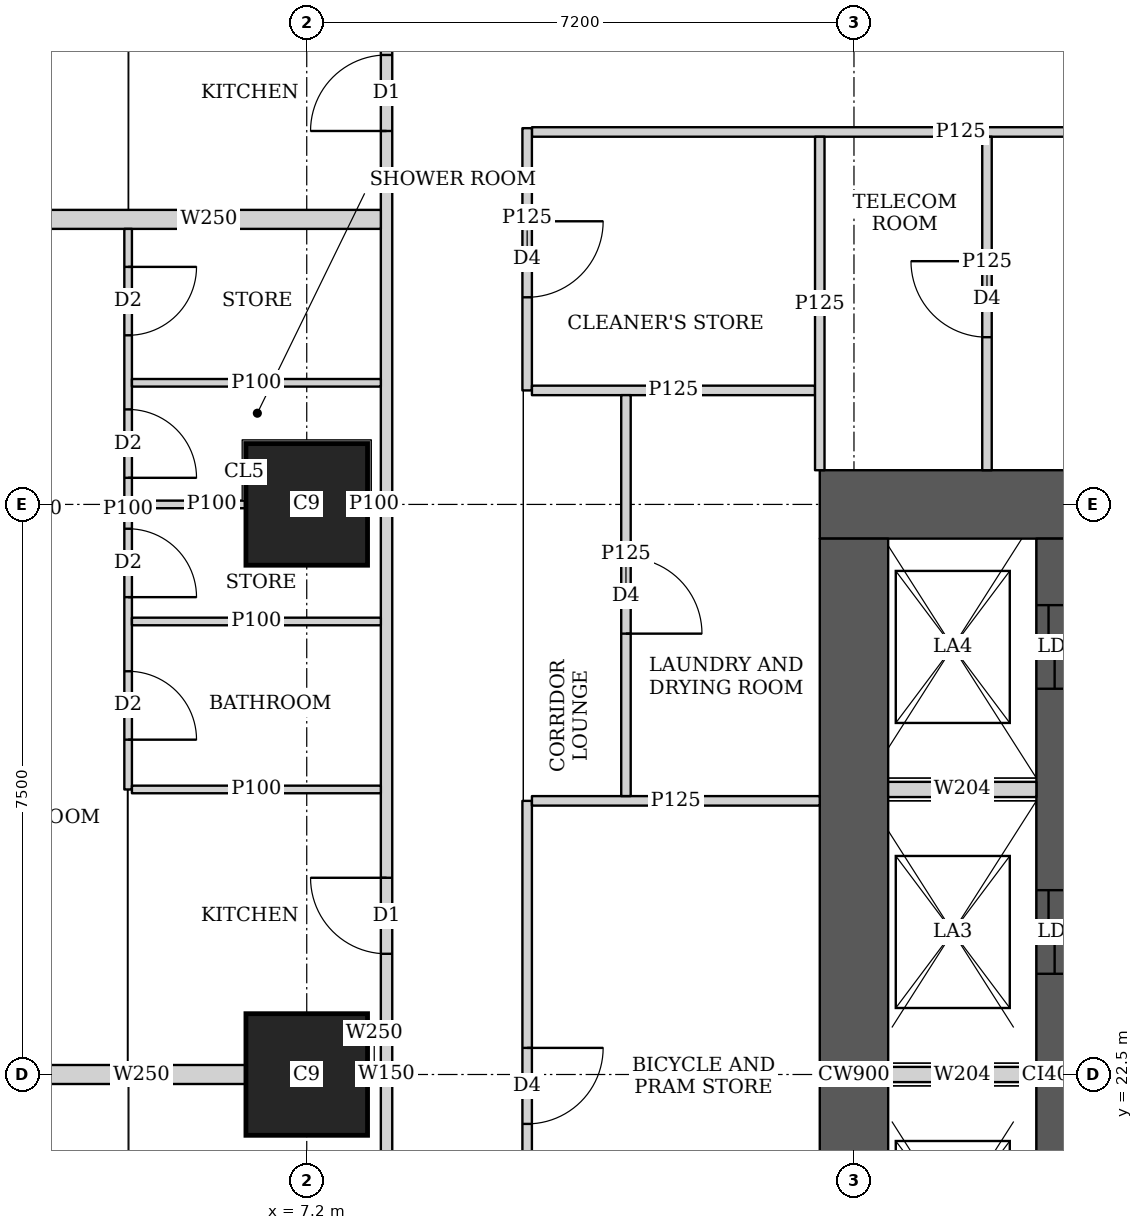
"""IFC4 building model, lengths in metres.
Left out: names, types, materials, properties, quantities, classifications, styles, units other than length and angle.
Written with IfcOpenShell. Run it as: python <this file> out.ifc"""

import sys

from ifc_helpers import new_model, si_unit, direction, frame, frame_2d, origin, origin_2d, place, context, subcontext, project, spatial, rectangle, extrude, element, fill, save


model = new_model("IFC4")
c1 = context("Model", 3, precision=1e-05, world=origin(), true_north=direction((0.0, 1.0)))
c2 = subcontext(c1, "Body", "Model", "MODEL_VIEW")
j1 = project(units=[si_unit("LENGTHUNIT", "METRE"), si_unit("PLANEANGLEUNIT", "RADIAN")], contexts=[c1])
p1 = place(None, origin())
s1 = spatial("IfcSite", under=j1, at=p1, CompositionType="ELEMENT")
p2 = place(p1, origin())
s2 = spatial("IfcBuilding", under=s1, at=p2, CompositionType="ELEMENT")
p3 = place(p2, frame((0.0, 0.0, 81.65)))
s3 = spatial("IfcBuildingStorey", under=s2, at=p3, CompositionType="ELEMENT", Elevation=81.65)
for number, where, z_axis, x_axis in (
    (1, (7.2, 22.5, 0.0), (0.0, 0.0, 1.0), (1.0, 0.0, 0.0)),
    (2, (7.2, 30.0, 0.0), (0.0, 0.0, 1.0), (1.0, 0.0, 0.0)),
):
    element("IfcColumn", number, at=place(p3, frame(where, z_axis=z_axis, x_axis=x_axis)), inside=s3, PredefinedType="COLUMN", context=c2, shape_type="SweptSolid", body=[
        extrude(rectangle(XDim=1.6, YDim=1.6, at=origin_2d()), origin(), (0.0, 0.0, 1.0), 3.75),
    ])
p4 = place(p3, frame((13.95, 30.0, 0.0), z_axis=(0.0, 0.0, 1.0), x_axis=(1.0, 0.0, 0.0)))
e3 = element("IfcWall", 3, at=p4, inside=s3, PredefinedType="SHEAR", context=c2, shape_type="SweptSolid", body=[
    extrude(rectangle(XDim=15.3, YDim=0.9, at=frame_2d((7.65, 0.0))), origin(), (0.0, 0.0, 1.0), 3.75),
])
p5 = place(p4, frame((4.45, 0.0, 0.0)))
e4 = element("IfcOpeningElement", 4, at=p5, cuts=e3, PredefinedType="OPENING", context=c2, shape_type="SweptSolid", body=[
    extrude(rectangle(XDim=1.8, YDim=2.1, at=frame_2d((0.9, 1.05))), frame((0.0, 0.46, 0.0), z_axis=(0.0, -1.0, 0.0), x_axis=(1.0, 0.0, 0.0)), (0.0, 0.0, 1.0), 0.92),
])
p6 = place(p4, frame((10.7, 0.0, 0.0)))
e5 = element("IfcOpeningElement", 5, at=p6, cuts=e3, PredefinedType="OPENING", context=c2, shape_type="SweptSolid", body=[
    extrude(rectangle(XDim=1.1, YDim=2.1, at=frame_2d((0.55, 1.05))), frame((0.0, 0.46, 0.0), z_axis=(0.0, -1.0, 0.0), x_axis=(1.0, 0.0, 0.0)), (0.0, 0.0, 1.0), 0.92),
])
p7 = place(p3, frame((14.4, 15.45, 0.0), z_axis=(0.0, 0.0, 1.0), x_axis=(0.0, 1.0, 0.0)))
e6 = element("IfcWall", 6, at=p7, inside=s3, PredefinedType="SHEAR", context=c2, shape_type="SweptSolid", body=[
    extrude(rectangle(XDim=14.1, YDim=0.9, at=frame_2d((7.05, 0.0))), origin(), (0.0, 0.0, 1.0), 3.75),
])
p8 = place(p3, frame((17.0, 15.45, 0.0), z_axis=(0.0, 0.0, 1.0), x_axis=(0.0, 1.0, 0.0)))
e7 = element("IfcWall", 7, at=p8, inside=s3, PredefinedType="SHEAR", context=c2, shape_type="SweptSolid", body=[
    extrude(rectangle(XDim=14.1, YDim=0.4, at=frame_2d((7.05, 0.0))), origin(), (0.0, 0.0, 1.0), 3.75),
])
p9 = place(p8, frame((0.875, 0.0, 0.0)))
e8 = element("IfcOpeningElement", 8, at=p9, cuts=e7, PredefinedType="OPENING", context=c2, shape_type="SweptSolid", body=[
    extrude(rectangle(XDim=1.1, YDim=2.1, at=frame_2d((0.55, 1.05))), frame((0.0, 0.21, 0.0), z_axis=(0.0, -1.0, 0.0), x_axis=(1.0, 0.0, 0.0)), (0.0, 0.0, 1.0), 0.42),
])
p10 = place(p8, frame((4.625, 0.0, 0.0)))
e9 = element("IfcOpeningElement", 9, at=p10, cuts=e7, PredefinedType="OPENING", context=c2, shape_type="SweptSolid", body=[
    extrude(rectangle(XDim=1.1, YDim=2.1, at=frame_2d((0.55, 1.05))), frame((0.0, 0.21, 0.0), z_axis=(0.0, -1.0, 0.0), x_axis=(1.0, 0.0, 0.0)), (0.0, 0.0, 1.0), 0.42),
])
p11 = place(p8, frame((8.375, 0.0, 0.0)))
e10 = element("IfcOpeningElement", 10, at=p11, cuts=e7, PredefinedType="OPENING", context=c2, shape_type="SweptSolid", body=[
    extrude(rectangle(XDim=1.1, YDim=2.1, at=frame_2d((0.55, 1.05))), frame((0.0, 0.21, 0.0), z_axis=(0.0, -1.0, 0.0), x_axis=(1.0, 0.0, 0.0)), (0.0, 0.0, 1.0), 0.42),
])
p12 = place(p8, frame((12.125, 0.0, 0.0)))
e11 = element("IfcOpeningElement", 11, at=p12, cuts=e7, PredefinedType="OPENING", context=c2, shape_type="SweptSolid", body=[
    extrude(rectangle(XDim=1.1, YDim=2.1, at=frame_2d((0.55, 1.05))), frame((0.0, 0.21, 0.0), z_axis=(0.0, -1.0, 0.0), x_axis=(1.0, 0.0, 0.0)), (0.0, 0.0, 1.0), 0.42),
])
p13 = place(p3, frame((8.25, 2.126, 0.0), z_axis=(0.0, 0.0, 1.0), x_axis=(0.0, 1.0, 0.0)))
e12 = element("IfcWall", 12, at=p13, inside=s3, PredefinedType="SOLIDWALL", context=c2, shape_type="SweptSolid", body=[
    extrude(rectangle(XDim=40.773, YDim=0.15, at=frame_2d((20.386, 0.0))), origin(), (0.0, 0.0, 1.0), 3.5),
])
p14 = place(p13, frame((17.787, 0.0, 0.0)))
e13 = element("IfcOpeningElement", 13, at=p14, cuts=e12, PredefinedType="OPENING", context=c2, shape_type="SweptSolid", body=[
    extrude(rectangle(XDim=1.0, YDim=2.1, at=frame_2d((0.5, 1.05))), frame((0.0, 0.085, 0.0), z_axis=(0.0, -1.0, 0.0), x_axis=(1.0, 0.0, 0.0)), (0.0, 0.0, 1.0), 0.17),
])
p15 = place(p13, frame((21.962, 0.0, 0.0)))
e14 = element("IfcOpeningElement", 14, at=p15, cuts=e12, PredefinedType="OPENING", context=c2, shape_type="SweptSolid", body=[
    extrude(rectangle(XDim=1.0, YDim=2.1, at=frame_2d((0.5, 1.05))), frame((0.0, 0.085, 0.0), z_axis=(0.0, -1.0, 0.0), x_axis=(1.0, 0.0, 0.0)), (0.0, 0.0, 1.0), 0.17),
])
p16 = place(p13, frame((32.787, 0.0, 0.0)))
e15 = element("IfcOpeningElement", 15, at=p16, cuts=e12, PredefinedType="OPENING", context=c2, shape_type="SweptSolid", body=[
    extrude(rectangle(XDim=1.0, YDim=2.1, at=frame_2d((0.5, 1.05))), frame((0.0, 0.085, 0.0), z_axis=(0.0, -1.0, 0.0), x_axis=(1.0, 0.0, 0.0)), (0.0, 0.0, 1.0), 0.17),
])
p17 = place(p3, frame((4.85, 26.25, 0.0), z_axis=(0.0, 0.0, 1.0), x_axis=(0.0, 1.0, 0.0)))
e16 = element("IfcWall", 16, at=p17, inside=s3, PredefinedType="PARTITIONING", context=c2, shape_type="SweptSolid", body=[
    extrude(rectangle(XDim=7.375, YDim=0.1, at=frame_2d((3.688, 0.0))), origin(), (0.0, 0.0, 1.0), 3.5),
])
p18 = place(p17, frame((0.655, 0.0, 0.0)))
e17 = element("IfcOpeningElement", 17, at=p18, cuts=e16, PredefinedType="OPENING", context=c2, shape_type="SweptSolid", body=[
    extrude(rectangle(XDim=0.9, YDim=2.1, at=frame_2d((0.45, 1.05))), frame((0.0, 0.06, 0.0), z_axis=(0.0, -1.0, 0.0), x_axis=(1.0, 0.0, 0.0)), (0.0, 0.0, 1.0), 0.12),
])
p19 = place(p17, frame((4.1, 0.0, 0.0)))
e18 = element("IfcOpeningElement", 18, at=p19, cuts=e16, PredefinedType="OPENING", context=c2, shape_type="SweptSolid", body=[
    extrude(rectangle(XDim=0.9, YDim=2.1, at=frame_2d((0.45, 1.05))), frame((0.0, 0.06, 0.0), z_axis=(0.0, -1.0, 0.0), x_axis=(1.0, 0.0, 0.0)), (0.0, 0.0, 1.0), 0.12),
])
p20 = place(p17, frame((2.53, 0.0, 0.0)))
e19 = element("IfcOpeningElement", 19, at=p20, cuts=e16, PredefinedType="OPENING", context=c2, shape_type="SweptSolid", body=[
    extrude(rectangle(XDim=0.9, YDim=2.1, at=frame_2d((0.45, 1.05))), frame((0.0, 0.06, 0.0), z_axis=(0.0, -1.0, 0.0), x_axis=(1.0, 0.0, 0.0)), (0.0, 0.0, 1.0), 0.12),
])
p21 = place(p17, frame((5.975, 0.0, 0.0)))
e20 = element("IfcOpeningElement", 20, at=p21, cuts=e16, PredefinedType="OPENING", context=c2, shape_type="SweptSolid", body=[
    extrude(rectangle(XDim=0.9, YDim=2.1, at=frame_2d((0.45, 1.05))), frame((0.0, 0.06, 0.0), z_axis=(0.0, -1.0, 0.0), x_axis=(1.0, 0.0, 0.0)), (0.0, 0.0, 1.0), 0.12),
])
p22 = place(p3, frame((4.9, 26.25, 0.0), z_axis=(0.0, 0.0, 1.0), x_axis=(1.0, 0.0, 0.0)))
e21 = element("IfcWall", 21, at=p22, inside=s3, PredefinedType="PARTITIONING", context=c2, shape_type="SweptSolid", body=[
    extrude(rectangle(XDim=3.275, YDim=0.1, at=frame_2d((1.638, 0.0))), origin(), (0.0, 0.0, 1.0), 3.5),
])
p23 = place(p3, frame((4.9, 30.0, 0.0), z_axis=(0.0, 0.0, 1.0), x_axis=(1.0, 0.0, 0.0)))
e22 = element("IfcWall", 22, at=p23, inside=s3, PredefinedType="PARTITIONING", context=c2, shape_type="SweptSolid", body=[
    extrude(rectangle(XDim=1.499, YDim=0.1, at=frame_2d((0.75, 0.0))), origin(), (0.0, 0.0, 1.0), 3.5),
])
p24 = place(p3, frame((8.001, 30.0, 0.0), z_axis=(0.0, 0.0, 1.0), x_axis=(1.0, 0.0, 0.0)))
e23 = element("IfcWall", 23, at=p24, inside=s3, PredefinedType="PARTITIONING", context=c2, shape_type="SweptSolid", body=[
    extrude(rectangle(XDim=0.174, YDim=0.1, at=frame_2d((0.087, 0.0))), origin(), (0.0, 0.0, 1.0), 3.5),
])
for number, where, z_axis, x_axis in (
    (24, (4.9, 28.46, 0.0), (0.0, 0.0, 1.0), (1.0, 0.0, 0.0)),
    (25, (4.9, 31.6, 0.0), (0.0, 0.0, 1.0), (1.0, 0.0, 0.0)),
):
    element("IfcWall", number, at=place(p3, frame(where, z_axis=z_axis, x_axis=x_axis)), inside=s3, PredefinedType="PARTITIONING", context=c2, shape_type="SweptSolid", body=[
        extrude(rectangle(XDim=3.275, YDim=0.1, at=frame_2d((1.638, 0.0))), origin(), (0.0, 0.0, 1.0), 3.5),
    ])
p25 = place(p3, frame((3.65, 22.5, 0.0), z_axis=(0.0, 0.0, 1.0), x_axis=(1.0, 0.0, 0.0)))
e26 = element("IfcWall", 26, at=p25, inside=s3, PredefinedType="SOLIDWALL", context=c2, shape_type="SweptSolid", body=[
    extrude(rectangle(XDim=2.749, YDim=0.25, at=frame_2d((1.375, 0.0))), origin(), (0.0, 0.0, 1.0), 3.5),
])
p26 = place(p3, frame((8.001, 22.5, 0.0), z_axis=(0.0, 0.0, 1.0), x_axis=(1.0, 0.0, 0.0)))
e27 = element("IfcWall", 27, at=p26, inside=s3, PredefinedType="SOLIDWALL", context=c2, shape_type="SweptSolid", body=[
    extrude(rectangle(XDim=0.174, YDim=0.25, at=frame_2d((0.087, 0.0))), origin(), (0.0, 0.0, 1.0), 3.5),
])
p27 = place(p3, frame((3.65, 33.75, 0.0), z_axis=(0.0, 0.0, 1.0), x_axis=(1.0, 0.0, 0.0)))
e28 = element("IfcWall", 28, at=p27, inside=s3, PredefinedType="SOLIDWALL", context=c2, shape_type="SweptSolid", body=[
    extrude(rectangle(XDim=4.525, YDim=0.25, at=frame_2d((2.263, 0.0))), origin(), (0.0, 0.0, 1.0), 3.5),
])
p28 = place(p3, frame((10.1, 10.05, 0.0), z_axis=(0.0, 0.0, 1.0), x_axis=(0.0, 1.0, 0.0)))
e29 = element("IfcWall", 29, at=p28, inside=s3, PredefinedType="PARTITIONING", context=c2, shape_type="SweptSolid", body=[
    extrude(rectangle(XDim=16.05, YDim=0.125, at=frame_2d((8.025, 0.0))), origin(), (0.0, 0.0, 1.0), 3.5),
])
p29 = place(p28, frame((1.675, 0.0, 0.0)))
e30 = element("IfcOpeningElement", 30, at=p29, cuts=e29, PredefinedType="OPENING", context=c2, shape_type="SweptSolid", body=[
    extrude(rectangle(XDim=1.0, YDim=2.1, at=frame_2d((0.5, 1.05))), frame((0.0, 0.073, 0.0), z_axis=(0.0, -1.0, 0.0), x_axis=(1.0, 0.0, 0.0)), (0.0, 0.0, 1.0), 0.145),
])
p30 = place(p28, frame((5.95, 0.0, 0.0)))
e31 = element("IfcOpeningElement", 31, at=p30, cuts=e29, PredefinedType="OPENING", context=c2, shape_type="SweptSolid", body=[
    extrude(rectangle(XDim=1.0, YDim=2.1, at=frame_2d((0.5, 1.05))), frame((0.0, 0.073, 0.0), z_axis=(0.0, -1.0, 0.0), x_axis=(1.0, 0.0, 0.0)), (0.0, 0.0, 1.0), 0.145),
])
p31 = place(p28, frame((11.8, 0.0, 0.0)))
e32 = element("IfcOpeningElement", 32, at=p31, cuts=e29, PredefinedType="OPENING", context=c2, shape_type="SweptSolid", body=[
    extrude(rectangle(XDim=1.0, YDim=2.1, at=frame_2d((0.5, 1.05))), frame((0.0, 0.073, 0.0), z_axis=(0.0, -1.0, 0.0), x_axis=(1.0, 0.0, 0.0)), (0.0, 0.0, 1.0), 0.145),
])
p32 = place(p3, frame((10.1, 31.5, 0.0), z_axis=(0.0, 0.0, 1.0), x_axis=(0.0, 1.0, 0.0)))
e33 = element("IfcWall", 33, at=p32, inside=s3, PredefinedType="PARTITIONING", context=c2, shape_type="SweptSolid", body=[
    extrude(rectangle(XDim=3.45, YDim=0.125, at=frame_2d((1.725, 0.0))), origin(), (0.0, 0.0, 1.0), 3.5),
])
p33 = place(p32, frame((1.225, 0.0, 0.0)))
e34 = element("IfcOpeningElement", 34, at=p33, cuts=e33, PredefinedType="OPENING", context=c2, shape_type="SweptSolid", body=[
    extrude(rectangle(XDim=1.0, YDim=2.1, at=frame_2d((0.5, 1.05))), frame((0.0, 0.073, 0.0), z_axis=(0.0, -1.0, 0.0), x_axis=(1.0, 0.0, 0.0)), (0.0, 0.0, 1.0), 0.145),
])
p34 = place(p3, frame((11.4, 26.163, 0.0), z_axis=(0.0, 0.0, 1.0), x_axis=(0.0, 1.0, 0.0)))
e35 = element("IfcWall", 35, at=p34, inside=s3, PredefinedType="PARTITIONING", context=c2, shape_type="SweptSolid", body=[
    extrude(rectangle(XDim=5.275, YDim=0.125, at=frame_2d((2.637, 0.0))), origin(), (0.0, 0.0, 1.0), 3.5),
])
p35 = place(p34, frame((2.137, 0.0, 0.0)))
e36 = element("IfcOpeningElement", 36, at=p35, cuts=e35, PredefinedType="OPENING", context=c2, shape_type="SweptSolid", body=[
    extrude(rectangle(XDim=1.0, YDim=2.1, at=frame_2d((0.5, 1.05))), frame((0.0, 0.073, 0.0), z_axis=(0.0, -1.0, 0.0), x_axis=(1.0, 0.0, 0.0)), (0.0, 0.0, 1.0), 0.145),
])
p36 = place(p3, frame((10.163, 26.1, 0.0), z_axis=(0.0, 0.0, 1.0), x_axis=(1.0, 0.0, 0.0)))
e37 = element("IfcWall", 37, at=p36, inside=s3, PredefinedType="PARTITIONING", context=c2, shape_type="SweptSolid", body=[
    extrude(rectangle(XDim=3.787, YDim=0.125, at=frame_2d((1.894, 0.0))), origin(), (0.0, 0.0, 1.0), 3.5),
])
p37 = place(p3, frame((10.163, 31.5, 0.0), z_axis=(0.0, 0.0, 1.0), x_axis=(1.0, 0.0, 0.0)))
e38 = element("IfcWall", 38, at=p37, inside=s3, PredefinedType="PARTITIONING", context=c2, shape_type="SweptSolid", body=[
    extrude(rectangle(XDim=3.725, YDim=0.125, at=frame_2d((1.862, 0.0))), origin(), (0.0, 0.0, 1.0), 3.5),
])
p38 = place(p3, frame((13.95, 30.45, 0.0), z_axis=(0.0, 0.0, 1.0), x_axis=(0.0, 1.0, 0.0)))
e39 = element("IfcWall", 39, at=p38, inside=s3, PredefinedType="PARTITIONING", context=c2, shape_type="SweptSolid", body=[
    extrude(rectangle(XDim=4.387, YDim=0.125, at=frame_2d((2.193, 0.0))), origin(), (0.0, 0.0, 1.0), 3.5),
])
p39 = place(p3, frame((10.163, 34.9, 0.0), z_axis=(0.0, 0.0, 1.0), x_axis=(1.0, 0.0, 0.0)))
e40 = element("IfcWall", 40, at=p39, inside=s3, PredefinedType="PARTITIONING", context=c2, shape_type="SweptSolid", body=[
    extrude(rectangle(XDim=11.287, YDim=0.125, at=frame_2d((5.644, 0.0))), origin(), (0.0, 0.0, 1.0), 3.5),
])
p40 = place(p39, frame((7.737, 0.0, 0.0)))
e41 = element("IfcOpeningElement", 41, at=p40, cuts=e40, PredefinedType="OPENING", context=c2, shape_type="SweptSolid", body=[
    extrude(rectangle(XDim=1.8, YDim=2.1, at=frame_2d((0.9, 1.05))), frame((0.0, 0.073, 0.0), z_axis=(0.0, -1.0, 0.0), x_axis=(1.0, 0.0, 0.0)), (0.0, 0.0, 1.0), 0.145),
])
p41 = place(p3, frame((16.15, 30.45, 0.0), z_axis=(0.0, 0.0, 1.0), x_axis=(0.0, 1.0, 0.0)))
e42 = element("IfcWall", 42, at=p41, inside=s3, PredefinedType="PARTITIONING", context=c2, shape_type="SweptSolid", body=[
    extrude(rectangle(XDim=4.387, YDim=0.125, at=frame_2d((2.193, 0.0))), origin(), (0.0, 0.0, 1.0), 3.5),
])
p42 = place(p41, frame((1.75, 0.0, 0.0)))
e43 = element("IfcOpeningElement", 43, at=p42, cuts=e42, PredefinedType="OPENING", context=c2, shape_type="SweptSolid", body=[
    extrude(rectangle(XDim=1.0, YDim=2.1, at=frame_2d((0.5, 1.05))), frame((0.0, 0.073, 0.0), z_axis=(0.0, -1.0, 0.0), x_axis=(1.0, 0.0, 0.0)), (0.0, 0.0, 1.0), 0.145),
])
for number, where, z_axis, x_axis in (
    (44, (14.85, 22.5, 0.0), (0.0, 0.0, 1.0), (1.0, 0.0, 0.0)),
    (45, (14.85, 26.25, 0.0), (0.0, 0.0, 1.0), (1.0, 0.0, 0.0)),
):
    element("IfcWall", number, at=place(p3, frame(where, z_axis=z_axis, x_axis=x_axis)), inside=s3, PredefinedType="SOLIDWALL", context=c2, shape_type="SweptSolid", body=[
        extrude(rectangle(XDim=1.95, YDim=0.2, at=frame_2d((0.975, 0.0))), origin(), (0.0, 0.0, 1.0), 3.5),
    ])
p43 = place(p18, origin())
e46 = element("IfcDoor", 46, at=p43, inside=s3, OperationType="SINGLE_SWING_RIGHT", PredefinedType="DOOR", context=c2, shape_type="SweptSolid", body=[
    extrude(rectangle(XDim=0.9, YDim=2.1, at=frame_2d((0.45, 1.05))), frame((0.0, 0.025, 0.0), z_axis=(0.0, -1.0, 0.0), x_axis=(1.0, 0.0, 0.0)), (0.0, 0.0, 1.0), 0.05),
])
fill(e17, e46)
p44 = place(p19, origin())
e47 = element("IfcDoor", 47, at=p44, inside=s3, OperationType="SINGLE_SWING_RIGHT", PredefinedType="DOOR", context=c2, shape_type="SweptSolid", body=[
    extrude(rectangle(XDim=0.9, YDim=2.1, at=frame_2d((0.45, 1.05))), frame((0.0, 0.025, 0.0), z_axis=(0.0, -1.0, 0.0), x_axis=(1.0, 0.0, 0.0)), (0.0, 0.0, 1.0), 0.05),
])
fill(e18, e47)
p45 = place(p20, origin())
e48 = element("IfcDoor", 48, at=p45, inside=s3, OperationType="SINGLE_SWING_RIGHT", PredefinedType="DOOR", context=c2, shape_type="SweptSolid", body=[
    extrude(rectangle(XDim=0.9, YDim=2.1, at=frame_2d((0.45, 1.05))), frame((0.0, 0.025, 0.0), z_axis=(0.0, -1.0, 0.0), x_axis=(1.0, 0.0, 0.0)), (0.0, 0.0, 1.0), 0.05),
])
fill(e19, e48)
p46 = place(p21, origin())
e49 = element("IfcDoor", 49, at=p46, inside=s3, OperationType="SINGLE_SWING_LEFT", PredefinedType="DOOR", context=c2, shape_type="SweptSolid", body=[
    extrude(rectangle(XDim=0.9, YDim=2.1, at=frame_2d((0.45, 1.05))), frame((0.0, 0.025, 0.0), z_axis=(0.0, -1.0, 0.0), x_axis=(1.0, 0.0, 0.0)), (0.0, 0.0, 1.0), 0.05),
])
fill(e20, e49)
p47 = place(p15, origin())
e50 = element("IfcDoor", 50, at=p47, inside=s3, OperationType="SINGLE_SWING_RIGHT", PredefinedType="DOOR", context=c2, shape_type="SweptSolid", body=[
    extrude(rectangle(XDim=1.0, YDim=2.1, at=frame_2d((0.5, 1.05))), frame((0.0, 0.025, 0.0), z_axis=(0.0, -1.0, 0.0), x_axis=(1.0, 0.0, 0.0)), (0.0, 0.0, 1.0), 0.05),
])
fill(e14, e50)
p48 = place(p16, origin())
e51 = element("IfcDoor", 51, at=p48, inside=s3, OperationType="SINGLE_SWING_LEFT", PredefinedType="DOOR", context=c2, shape_type="SweptSolid", body=[
    extrude(rectangle(XDim=1.0, YDim=2.1, at=frame_2d((0.5, 1.05))), frame((0.0, 0.025, 0.0), z_axis=(0.0, -1.0, 0.0), x_axis=(1.0, 0.0, 0.0)), (0.0, 0.0, 1.0), 0.05),
])
fill(e15, e51)
p49 = place(p31, origin())
e52 = element("IfcDoor", 52, at=p49, inside=s3, OperationType="SINGLE_SWING_LEFT", PredefinedType="DOOR", context=c2, shape_type="SweptSolid", body=[
    extrude(rectangle(XDim=1.0, YDim=2.1, at=frame_2d((0.5, 1.05))), frame((0.0, 0.025, 0.0), z_axis=(0.0, -1.0, 0.0), x_axis=(1.0, 0.0, 0.0)), (0.0, 0.0, 1.0), 0.05),
])
fill(e32, e52)
p50 = place(p35, origin())
e53 = element("IfcDoor", 53, at=p50, inside=s3, OperationType="SINGLE_SWING_RIGHT", PredefinedType="DOOR", context=c2, shape_type="SweptSolid", body=[
    extrude(rectangle(XDim=1.0, YDim=2.1, at=frame_2d((0.5, 1.05))), frame((0.0, 0.025, 0.0), z_axis=(0.0, -1.0, 0.0), x_axis=(1.0, 0.0, 0.0)), (0.0, 0.0, 1.0), 0.05),
])
fill(e36, e53)
p51 = place(p33, origin())
e54 = element("IfcDoor", 54, at=p51, inside=s3, OperationType="SINGLE_SWING_LEFT", PredefinedType="DOOR", context=c2, shape_type="SweptSolid", body=[
    extrude(rectangle(XDim=1.0, YDim=2.1, at=frame_2d((0.5, 1.05))), frame((0.0, 0.025, 0.0), z_axis=(0.0, -1.0, 0.0), x_axis=(1.0, 0.0, 0.0)), (0.0, 0.0, 1.0), 0.05),
])
fill(e34, e54)
p52 = place(p42, origin())
e55 = element("IfcDoor", 55, at=p52, inside=s3, OperationType="SINGLE_SWING_RIGHT", PredefinedType="DOOR", context=c2, shape_type="SweptSolid", body=[
    extrude(rectangle(XDim=1.0, YDim=2.1, at=frame_2d((0.5, 1.05))), frame((0.0, 0.025, 0.0), z_axis=(0.0, -1.0, 0.0), x_axis=(1.0, 0.0, 0.0)), (0.0, 0.0, 1.0), 0.05),
])
fill(e43, e55)
p53 = place(p11, origin())
e56 = element("IfcDoor", 56, at=p53, inside=s3, OperationType="DOUBLE_DOOR_SLIDING", PredefinedType="DOOR", context=c2, shape_type="SweptSolid", body=[
    extrude(rectangle(XDim=1.1, YDim=2.1, at=frame_2d((0.55, 1.05))), frame((0.0, 0.025, 0.0), z_axis=(0.0, -1.0, 0.0), x_axis=(1.0, 0.0, 0.0)), (0.0, 0.0, 1.0), 0.05),
])
fill(e10, e56)
p54 = place(p12, origin())
e57 = element("IfcDoor", 57, at=p54, inside=s3, OperationType="DOUBLE_DOOR_SLIDING", PredefinedType="DOOR", context=c2, shape_type="SweptSolid", body=[
    extrude(rectangle(XDim=1.1, YDim=2.1, at=frame_2d((0.55, 1.05))), frame((0.0, 0.025, 0.0), z_axis=(0.0, -1.0, 0.0), x_axis=(1.0, 0.0, 0.0)), (0.0, 0.0, 1.0), 0.05),
])
fill(e11, e57)
save(model, sys.argv[1])
